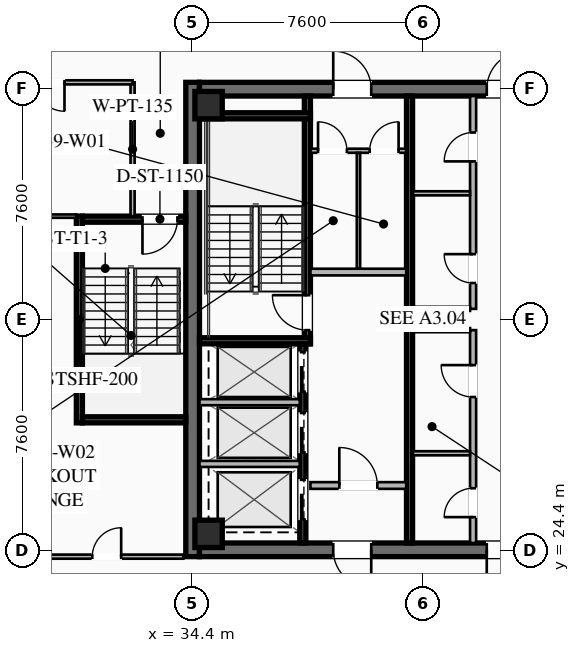
"""IFC4 building model, lengths in metres.
Left out: names, types, materials, properties, quantities, classifications, styles, units other than length and angle.
Written with IfcOpenShell. Run it as: python <this file> out.ifc"""

import sys

from ifc_helpers import new_model, si_unit, direction, frame, frame_2d, origin, origin_2d, place, context, subcontext, project, spatial, rectangle, hollow_rectangle, extrude, element, fill, save


model = new_model("IFC4")
c1 = context("Model", 3, precision=1e-05, world=origin(), true_north=direction((0.0, 1.0)))
c2 = subcontext(c1, "Body", "Model", "MODEL_VIEW")
j1 = project(units=[si_unit("LENGTHUNIT", "METRE"), si_unit("PLANEANGLEUNIT", "RADIAN")], contexts=[c1])
p1 = place(None, origin())
s1 = spatial("IfcSite", under=j1, at=p1, CompositionType="ELEMENT")
p2 = place(p1, origin())
s2 = spatial("IfcBuilding", under=s1, at=p2, CompositionType="ELEMENT")
p3 = place(p2, frame((0.0, 0.0, 255.4)))
s3 = spatial("IfcBuildingStorey", under=s2, at=p3, CompositionType="ELEMENT", Elevation=255.4)
p4 = place(p3, frame((34.425, 24.2, 0.0), z_axis=(0.0, 0.0, 1.0), x_axis=(0.0, 1.0, 0.0)))
e1 = element("IfcWall", 1, at=p4, inside=s3, PredefinedType="SHEAR", context=c2, shape_type="SweptSolid", body=[
    extrude(rectangle(XDim=15.6, YDim=0.45, at=frame_2d((7.8, 0.0))), origin(), (0.0, 0.0, 1.0), 4.0),
])
p5 = place(p3, frame((49.35, 24.425, 0.0), z_axis=(0.0, 0.0, 1.0), x_axis=(-1.0, 0.0, 0.0)))
e2 = element("IfcWall", 2, at=p5, inside=s3, PredefinedType="SHEAR", context=c2, shape_type="SweptSolid", body=[
    extrude(rectangle(XDim=14.7, YDim=0.45, at=frame_2d((7.35, 0.0))), origin(), (0.0, 0.0, 1.0), 4.0),
])
p6 = place(p5, frame((9.05, 0.0, 0.0)))
e3 = element("IfcOpeningElement", 3, at=p6, cuts=e2, PredefinedType="OPENING", context=c2, shape_type="SweptSolid", body=[
    extrude(rectangle(XDim=1.25, YDim=2.25, at=frame_2d((0.625, 1.125))), frame((0.0, 0.235, 0.0), z_axis=(0.0, -1.0, 0.0), x_axis=(1.0, 0.0, 0.0)), (0.0, 0.0, 1.0), 0.47),
])
p7 = place(p5, frame((4.0, 0.0, 0.0)))
e4 = element("IfcOpeningElement", 4, at=p7, cuts=e2, PredefinedType="OPENING", context=c2, shape_type="SweptSolid", body=[
    extrude(rectangle(XDim=1.25, YDim=2.25, at=frame_2d((0.625, 1.125))), frame((0.0, 0.235, 0.0), z_axis=(0.0, -1.0, 0.0), x_axis=(1.0, 0.0, 0.0)), (0.0, 0.0, 1.0), 0.47),
])
p8 = place(p3, frame((34.65, 39.575, 0.0), z_axis=(0.0, 0.0, 1.0), x_axis=(1.0, 0.0, 0.0)))
e5 = element("IfcWall", 5, at=p8, inside=s3, PredefinedType="SHEAR", context=c2, shape_type="SweptSolid", body=[
    extrude(rectangle(XDim=14.7, YDim=0.45, at=frame_2d((7.35, 0.0))), origin(), (0.0, 0.0, 1.0), 4.0),
])
p9 = place(p8, frame((4.4, 0.0, 0.0)))
e6 = element("IfcOpeningElement", 6, at=p9, cuts=e5, PredefinedType="OPENING", context=c2, shape_type="SweptSolid", body=[
    extrude(rectangle(XDim=1.25, YDim=2.25, at=frame_2d((0.625, 1.125))), frame((0.0, 0.235, 0.0), z_axis=(0.0, -1.0, 0.0), x_axis=(1.0, 0.0, 0.0)), (0.0, 0.0, 1.0), 0.47),
])
p10 = place(p8, frame((9.45, 0.0, 0.0)))
e7 = element("IfcOpeningElement", 7, at=p10, cuts=e5, PredefinedType="OPENING", context=c2, shape_type="SweptSolid", body=[
    extrude(rectangle(XDim=1.25, YDim=2.25, at=frame_2d((0.625, 1.125))), frame((0.0, 0.235, 0.0), z_axis=(0.0, -1.0, 0.0), x_axis=(1.0, 0.0, 0.0)), (0.0, 0.0, 1.0), 0.47),
])
for number, where, z_axis, x_axis in (
    (8, (34.95, 24.95, 0.0), (0.0, 0.0, 1.0), (1.0, 0.0, 0.0)),
    (9, (34.95, 39.05, 0.0), (0.0, 0.0, 1.0), (1.0, 0.0, 0.0)),
):
    element("IfcColumn", number, at=place(p3, frame(where, z_axis=z_axis, x_axis=x_axis)), inside=s3, PredefinedType="COLUMN", context=c2, shape_type="SweptSolid", body=[
        extrude(hollow_rectangle(XDim=0.9, YDim=0.9, WallThickness=0.04, at=origin_2d()), origin(), (0.0, 0.0, 1.0), 3.78),
    ])
p11 = place(p3, frame((38.2, 31.2, 0.0), z_axis=(0.0, 0.0, 1.0), x_axis=(0.0, 1.0, 0.0)))
e10 = element("IfcWall", 10, at=p11, inside=s3, PredefinedType="SHEAR", context=c2, shape_type="SweptSolid", body=[
    extrude(rectangle(XDim=8.15, YDim=0.2, at=frame_2d((4.075, 0.0))), origin(), (0.0, 0.0, 1.0), 3.78),
])
p12 = place(p11, frame((0.45, 0.0, 0.0)))
e11 = element("IfcOpeningElement", 11, at=p12, cuts=e10, PredefinedType="OPENING", context=c2, shape_type="SweptSolid", body=[
    extrude(rectangle(XDim=1.15, YDim=2.2, at=frame_2d((0.575, 1.1))), frame((0.0, 0.11, 0.0), z_axis=(0.0, -1.0, 0.0), x_axis=(1.0, 0.0, 0.0)), (0.0, 0.0, 1.0), 0.22),
])
for number, where, z_axis, x_axis in (
    (12, (34.65, 31.3, 0.0), (0.0, 0.0, 1.0), (1.0, 0.0, 0.0)),
    (13, (34.65, 38.7, 0.0), (0.0, 0.0, 1.0), (1.0, 0.0, 0.0)),
):
    element("IfcWall", number, at=place(p3, frame(where, z_axis=z_axis, x_axis=x_axis)), inside=s3, PredefinedType="SHEAR", context=c2, shape_type="SweptSolid", body=[
        extrude(rectangle(XDim=3.65, YDim=0.2, at=frame_2d((1.825, 0.0))), origin(), (0.0, 0.0, 1.0), 3.78),
    ])
p13 = place(p3, frame((41.56, 24.65, 0.0), z_axis=(0.0, 0.0, 1.0), x_axis=(0.0, 1.0, 0.0)))
e14 = element("IfcWall", 14, at=p13, inside=s3, PredefinedType="SHEAR", context=c2, shape_type="SweptSolid", body=[
    extrude(rectangle(XDim=14.7, YDim=0.2, at=frame_2d((7.35, 0.0))), origin(), (0.0, 0.0, 1.0), 3.78),
])
p14 = place(p3, frame((38.3, 33.56, 0.0), z_axis=(0.0, 0.0, 1.0), x_axis=(1.0, 0.0, 0.0)))
e15 = element("IfcWall", 15, at=p14, inside=s3, PredefinedType="SOLIDWALL", context=c2, shape_type="SweptSolid", body=[
    extrude(rectangle(XDim=3.15, YDim=0.22, at=frame_2d((1.575, 0.0))), origin(), (0.0, 0.0, 1.0), 2.971),
])
p15 = place(p3, frame((38.3, 26.54, 0.0), z_axis=(0.0, 0.0, 1.0), x_axis=(1.0, 0.0, 0.0)))
e16 = element("IfcWall", 16, at=p15, inside=s3, PredefinedType="SOLIDWALL", context=c2, shape_type="SweptSolid", body=[
    extrude(rectangle(XDim=3.15, YDim=0.22, at=frame_2d((1.575, 0.0))), origin(), (0.0, 0.0, 1.0), 2.971),
])
p16 = place(p15, frame((0.95, 0.0, 0.0)))
e17 = element("IfcOpeningElement", 17, at=p16, cuts=e16, PredefinedType="OPENING", context=c2, shape_type="SweptSolid", body=[
    extrude(rectangle(XDim=1.25, YDim=2.25, at=frame_2d((0.625, 1.125))), frame((0.0, 0.12, 0.0), z_axis=(0.0, -1.0, 0.0), x_axis=(1.0, 0.0, 0.0)), (0.0, 0.0, 1.0), 0.24),
])
p17 = place(p3, frame((38.05, 24.65, 0.0), z_axis=(0.0, 0.0, 1.0), x_axis=(0.0, 1.0, 0.0)))
e18 = element("IfcWall", 18, at=p17, inside=s3, PredefinedType="SHEAR", context=c2, shape_type="SweptSolid", body=[
    extrude(rectangle(XDim=6.55, YDim=0.2, at=frame_2d((3.275, 0.0))), origin(), (0.0, 0.0, 1.0), 3.78),
])
p18 = place(p17, frame((4.975, 0.0, 0.0)))
e19 = element("IfcOpeningElement", 19, at=p18, cuts=e18, PredefinedType="OPENING", context=c2, shape_type="SweptSolid", body=[
    extrude(rectangle(XDim=1.3, YDim=2.25, at=frame_2d((0.65, 1.125))), frame((0.0, 0.11, 0.0), z_axis=(0.0, -1.0, 0.0), x_axis=(1.0, 0.0, 0.0)), (0.0, 0.0, 1.0), 0.22),
])
p19 = place(p17, frame((2.975, 0.0, 0.0)))
e20 = element("IfcOpeningElement", 20, at=p19, cuts=e18, PredefinedType="OPENING", context=c2, shape_type="SweptSolid", body=[
    extrude(rectangle(XDim=1.3, YDim=2.25, at=frame_2d((0.65, 1.125))), frame((0.0, 0.11, 0.0), z_axis=(0.0, -1.0, 0.0), x_axis=(1.0, 0.0, 0.0)), (0.0, 0.0, 1.0), 0.22),
])
p20 = place(p17, frame((0.775, 0.0, 0.0)))
e21 = element("IfcOpeningElement", 21, at=p20, cuts=e18, PredefinedType="OPENING", context=c2, shape_type="SweptSolid", body=[
    extrude(rectangle(XDim=1.3, YDim=2.25, at=frame_2d((0.65, 1.125))), frame((0.0, 0.11, 0.0), z_axis=(0.0, -1.0, 0.0), x_axis=(1.0, 0.0, 0.0)), (0.0, 0.0, 1.0), 0.22),
])
for number, where, z_axis, x_axis in (
    (22, (34.65, 27.25, 0.0), (0.0, 0.0, 1.0), (1.0, 0.0, 0.0)),
    (23, (34.65, 29.28, 0.0), (0.0, 0.0, 1.0), (1.0, 0.0, 0.0)),
):
    element("IfcWall", number, at=place(p3, frame(where, z_axis=z_axis, x_axis=x_axis)), inside=s3, PredefinedType="SOLIDWALL", context=c2, shape_type="SweptSolid", body=[
        extrude(rectangle(XDim=3.3, YDim=0.2, at=frame_2d((1.65, 0.0))), origin(), (0.0, 0.0, 1.0), 3.78),
    ])
p21 = place(p3, frame((38.3, 37.55, 0.0), z_axis=(0.0, 0.0, 1.0), x_axis=(1.0, 0.0, 0.0)))
e24 = element("IfcWall", 24, at=p21, inside=s3, PredefinedType="PARTITIONING", context=c2, shape_type="SweptSolid", body=[
    extrude(rectangle(XDim=3.15, YDim=0.135, at=frame_2d((1.575, 0.0))), origin(), (0.0, 0.0, 1.0), 2.971),
])
p22 = place(p21, frame((0.25, 0.0, 0.0)))
e25 = element("IfcOpeningElement", 25, at=p22, cuts=e24, PredefinedType="OPENING", context=c2, shape_type="SweptSolid", body=[
    extrude(rectangle(XDim=0.95, YDim=2.05, at=frame_2d((0.475, 1.025))), frame((0.0, 0.077, 0.0), z_axis=(0.0, -1.0, 0.0), x_axis=(1.0, 0.0, 0.0)), (0.0, 0.0, 1.0), 0.155),
])
p23 = place(p21, frame((1.95, 0.0, 0.0)))
e26 = element("IfcOpeningElement", 26, at=p23, cuts=e24, PredefinedType="OPENING", context=c2, shape_type="SweptSolid", body=[
    extrude(rectangle(XDim=0.95, YDim=2.05, at=frame_2d((0.475, 1.025))), frame((0.0, 0.077, 0.0), z_axis=(0.0, -1.0, 0.0), x_axis=(1.0, 0.0, 0.0)), (0.0, 0.0, 1.0), 0.155),
])
p24 = place(p3, frame((39.88, 33.68, 0.0), z_axis=(0.0, 0.0, 1.0), x_axis=(0.0, 1.0, 0.0)))
e27 = element("IfcWall", 27, at=p24, inside=s3, PredefinedType="PARTITIONING", context=c2, shape_type="SweptSolid", body=[
    extrude(rectangle(XDim=3.8, YDim=0.11, at=frame_2d((1.9, 0.0))), origin(), (0.0, 0.0, 1.0), 2.971),
])
p25 = place(p3, frame((43.65, 24.65, 0.0), z_axis=(0.0, 0.0, 1.0), x_axis=(0.0, 1.0, 0.0)))
e28 = element("IfcWall", 28, at=p25, inside=s3, PredefinedType="SOLIDWALL", context=c2, shape_type="SweptSolid", body=[
    extrude(rectangle(XDim=7.0, YDim=0.2, at=frame_2d((3.5, 0.0))), origin(), (0.0, 0.0, 1.0), 2.971),
])
p26 = place(p25, frame((0.85, 0.0, 0.0)))
e29 = element("IfcOpeningElement", 29, at=p26, cuts=e28, PredefinedType="OPENING", context=c2, shape_type="SweptSolid", body=[
    extrude(rectangle(XDim=0.95, YDim=2.05, at=frame_2d((0.475, 1.025))), frame((0.0, 0.11, 0.0), z_axis=(0.0, -1.0, 0.0), x_axis=(1.0, 0.0, 0.0)), (0.0, 0.0, 1.0), 0.22),
])
p27 = place(p25, frame((4.8, 0.0, 0.0)))
e30 = element("IfcOpeningElement", 30, at=p27, cuts=e28, PredefinedType="OPENING", context=c2, shape_type="SweptSolid", body=[
    extrude(rectangle(XDim=1.05, YDim=2.2, at=frame_2d((0.525, 1.1))), frame((0.0, 0.11, 0.0), z_axis=(0.0, -1.0, 0.0), x_axis=(1.0, 0.0, 0.0)), (0.0, 0.0, 1.0), 0.22),
])
for number, where, z_axis, x_axis in (
    (31, (41.67, 31.65, 0.0), (0.0, 0.0, 1.0), (1.0, 0.0, 0.0)),
    (32, (41.67, 27.6, 0.0), (0.0, 0.0, 1.0), (1.0, 0.0, 0.0)),
):
    element("IfcWall", number, at=place(p3, frame(where, z_axis=z_axis, x_axis=x_axis)), inside=s3, PredefinedType="PARTITIONING", context=c2, shape_type="SweptSolid", body=[
        extrude(rectangle(XDim=1.88, YDim=0.135, at=frame_2d((0.94, 0.0))), origin(), (0.0, 0.0, 1.0), 2.971),
    ])
p28 = place(p3, frame((43.65, 32.35, 0.0), z_axis=(0.0, 0.0, 1.0), x_axis=(0.0, 1.0, 0.0)))
e33 = element("IfcWall", 33, at=p28, inside=s3, PredefinedType="SOLIDWALL", context=c2, shape_type="SweptSolid", body=[
    extrude(rectangle(XDim=7.0, YDim=0.2, at=frame_2d((3.5, 0.0))), origin(), (0.0, 0.0, 1.0), 2.971),
])
p29 = place(p28, frame((0.85, 0.0, 0.0)))
e34 = element("IfcOpeningElement", 34, at=p29, cuts=e33, PredefinedType="OPENING", context=c2, shape_type="SweptSolid", body=[
    extrude(rectangle(XDim=0.95, YDim=2.05, at=frame_2d((0.475, 1.025))), frame((0.0, 0.11, 0.0), z_axis=(0.0, -1.0, 0.0), x_axis=(1.0, 0.0, 0.0)), (0.0, 0.0, 1.0), 0.22),
])
p30 = place(p28, frame((4.85, 0.0, 0.0)))
e35 = element("IfcOpeningElement", 35, at=p30, cuts=e33, PredefinedType="OPENING", context=c2, shape_type="SweptSolid", body=[
    extrude(rectangle(XDim=0.95, YDim=2.05, at=frame_2d((0.475, 1.025))), frame((0.0, 0.11, 0.0), z_axis=(0.0, -1.0, 0.0), x_axis=(1.0, 0.0, 0.0)), (0.0, 0.0, 1.0), 0.22),
])
for number, where, z_axis, x_axis in (
    (36, (41.67, 32.35, 0.0), (0.0, 0.0, 1.0), (1.0, 0.0, 0.0)),
    (37, (41.67, 36.15, 0.0), (0.0, 0.0, 1.0), (1.0, 0.0, 0.0)),
):
    element("IfcWall", number, at=place(p3, frame(where, z_axis=z_axis, x_axis=x_axis)), inside=s3, PredefinedType="PARTITIONING", context=c2, shape_type="SweptSolid", body=[
        extrude(rectangle(XDim=1.88, YDim=0.135, at=frame_2d((0.94, 0.0))), origin(), (0.0, 0.0, 1.0), 2.971),
    ])
p31 = place(p3, frame((30.7, 28.6, 0.0), z_axis=(0.0, 0.0, 1.0), x_axis=(0.0, 1.0, 0.0)))
e38 = element("IfcWall", 38, at=p31, inside=s3, PredefinedType="SHEAR", context=c2, shape_type="SweptSolid", body=[
    extrude(rectangle(XDim=6.8, YDim=0.2, at=frame_2d((3.4, 0.0))), origin(), (0.0, 0.0, 1.0), 3.78),
])
p32 = place(p3, frame((34.2, 35.3, 0.0), z_axis=(0.0, 0.0, 1.0), x_axis=(-1.0, 0.0, 0.0)))
e39 = element("IfcWall", 39, at=p32, inside=s3, PredefinedType="SHEAR", context=c2, shape_type="SweptSolid", body=[
    extrude(rectangle(XDim=3.4, YDim=0.2, at=frame_2d((1.7, 0.0))), origin(), (0.0, 0.0, 1.0), 3.78),
])
p33 = place(p32, frame((0.275, 0.0, 0.0)))
e40 = element("IfcOpeningElement", 40, at=p33, cuts=e39, PredefinedType="OPENING", context=c2, shape_type="SweptSolid", body=[
    extrude(rectangle(XDim=1.15, YDim=2.2, at=frame_2d((0.575, 1.1))), frame((0.0, 0.11, 0.0), z_axis=(0.0, -1.0, 0.0), x_axis=(1.0, 0.0, 0.0)), (0.0, 0.0, 1.0), 0.22),
])
p34 = place(p3, frame((30.8, 28.7, 0.0), z_axis=(0.0, 0.0, 1.0), x_axis=(1.0, 0.0, 0.0)))
e41 = element("IfcWall", 41, at=p34, inside=s3, PredefinedType="SHEAR", context=c2, shape_type="SweptSolid", body=[
    extrude(rectangle(XDim=3.4, YDim=0.2, at=frame_2d((1.7, 0.0))), origin(), (0.0, 0.0, 1.0), 3.78),
])
p35 = place(p3, frame((32.45, 35.4, 0.0), z_axis=(0.0, 0.0, 1.0), x_axis=(0.0, 1.0, 0.0)))
e42 = element("IfcWall", 42, at=p35, inside=s3, PredefinedType="PARTITIONING", context=c2, shape_type="SweptSolid", body=[
    extrude(rectangle(XDim=4.4, YDim=0.135, at=frame_2d((2.2, 0.0))), origin(), (0.0, 0.0, 1.0), 2.971),
])
p36 = place(p3, frame((32.45, 39.8, 0.0), z_axis=(0.0, 0.0, 1.0), x_axis=(-1.0, 0.0, 0.0)))
e43 = element("IfcWall", 43, at=p36, inside=s3, PredefinedType="PARTITIONING", context=c2, shape_type="SweptSolid", body=[
    extrude(rectangle(XDim=6.13, YDim=0.135, at=frame_2d((3.065, 0.0))), origin(), (0.0, 0.0, 1.0), 2.971),
])
p37 = place(p36, frame((2.24, 0.0, 0.0)))
e44 = element("IfcOpeningElement", 44, at=p37, cuts=e43, PredefinedType="OPENING", context=c2, shape_type="SweptSolid", body=[
    extrude(rectangle(XDim=0.95, YDim=2.05, at=frame_2d((0.475, 1.025))), frame((0.0, 0.077, 0.0), z_axis=(0.0, -1.0, 0.0), x_axis=(1.0, 0.0, 0.0)), (0.0, 0.0, 1.0), 0.155),
])
p38 = place(p3, frame((26.32, 24.2, 0.0), z_axis=(0.0, 0.0, 1.0), x_axis=(1.0, 0.0, 0.0)))
e45 = element("IfcWall", 45, at=p38, inside=s3, PredefinedType="PARTITIONING", context=c2, shape_type="SweptSolid", body=[
    extrude(rectangle(XDim=7.8, YDim=0.135, at=frame_2d((3.9, 0.0))), origin(), (0.0, 0.0, 1.0), 2.971),
])
p39 = place(p38, frame((4.805, 0.0, 0.0)))
e46 = element("IfcOpeningElement", 46, at=p39, cuts=e45, PredefinedType="OPENING", context=c2, shape_type="SweptSolid", body=[
    extrude(rectangle(XDim=0.95, YDim=2.05, at=frame_2d((0.475, 1.025))), frame((0.0, 0.077, 0.0), z_axis=(0.0, -1.0, 0.0), x_axis=(1.0, 0.0, 0.0)), (0.0, 0.0, 1.0), 0.155),
])
p40 = place(p3, frame((30.6, 35.4, 0.0), z_axis=(0.0, 0.0, 1.0), x_axis=(-1.0, 0.0, 0.0)))
e47 = element("IfcWall", 47, at=p40, inside=s3, PredefinedType="PARTITIONING", context=c2, shape_type="SweptSolid", body=[
    extrude(rectangle(XDim=4.28, YDim=0.11, at=frame_2d((2.14, 0.0))), origin(), (0.0, 0.0, 1.0), 2.971),
])
p41 = place(p9, origin())
e48 = element("IfcDoor", 48, at=p41, inside=s3, OperationType="SINGLE_SWING_LEFT", PredefinedType="DOOR", context=c2, shape_type="SweptSolid", body=[
    extrude(rectangle(XDim=1.25, YDim=2.25, at=frame_2d((0.625, 1.125))), frame((0.0, 0.025, 0.0), z_axis=(0.0, -1.0, 0.0), x_axis=(1.0, 0.0, 0.0)), (0.0, 0.0, 1.0), 0.05),
])
fill(e6, e48)
p42 = place(p10, origin())
e49 = element("IfcDoor", 49, at=p42, inside=s3, OperationType="SINGLE_SWING_RIGHT", PredefinedType="DOOR", context=c2, shape_type="SweptSolid", body=[
    extrude(rectangle(XDim=1.25, YDim=2.25, at=frame_2d((0.625, 1.125))), frame((0.0, 0.025, 0.0), z_axis=(0.0, -1.0, 0.0), x_axis=(1.0, 0.0, 0.0)), (0.0, 0.0, 1.0), 0.05),
])
fill(e7, e49)
p43 = place(p6, origin())
e50 = element("IfcDoor", 50, at=p43, inside=s3, OperationType="SINGLE_SWING_LEFT", PredefinedType="DOOR", context=c2, shape_type="SweptSolid", body=[
    extrude(rectangle(XDim=1.25, YDim=2.25, at=frame_2d((0.625, 1.125))), frame((0.0, 0.025, 0.0), z_axis=(0.0, -1.0, 0.0), x_axis=(1.0, 0.0, 0.0)), (0.0, 0.0, 1.0), 0.05),
])
fill(e3, e50)
p44 = place(p7, origin())
e51 = element("IfcDoor", 51, at=p44, inside=s3, OperationType="SINGLE_SWING_RIGHT", PredefinedType="DOOR", context=c2, shape_type="SweptSolid", body=[
    extrude(rectangle(XDim=1.25, YDim=2.25, at=frame_2d((0.625, 1.125))), frame((0.0, 0.025, 0.0), z_axis=(0.0, -1.0, 0.0), x_axis=(1.0, 0.0, 0.0)), (0.0, 0.0, 1.0), 0.05),
])
fill(e4, e51)
p45 = place(p12, origin())
e52 = element("IfcDoor", 52, at=p45, inside=s3, OperationType="SINGLE_SWING_RIGHT", PredefinedType="DOOR", context=c2, shape_type="SweptSolid", body=[
    extrude(rectangle(XDim=1.15, YDim=2.2, at=frame_2d((0.575, 1.1))), frame((0.0, 0.025, 0.0), z_axis=(0.0, -1.0, 0.0), x_axis=(1.0, 0.0, 0.0)), (0.0, 0.0, 1.0), 0.05),
])
fill(e11, e52)
p46 = place(p16, origin())
e53 = element("IfcDoor", 53, at=p46, inside=s3, OperationType="SINGLE_SWING_LEFT", PredefinedType="DOOR", context=c2, shape_type="SweptSolid", body=[
    extrude(rectangle(XDim=1.25, YDim=2.25, at=frame_2d((0.625, 1.125))), frame((0.0, 0.025, 0.0), z_axis=(0.0, -1.0, 0.0), x_axis=(1.0, 0.0, 0.0)), (0.0, 0.0, 1.0), 0.05),
])
fill(e17, e53)
p47 = place(p22, origin())
e54 = element("IfcDoor", 54, at=p47, inside=s3, OperationType="SINGLE_SWING_LEFT", PredefinedType="DOOR", context=c2, shape_type="SweptSolid", body=[
    extrude(rectangle(XDim=0.95, YDim=2.05, at=frame_2d((0.475, 1.025))), frame((0.0, 0.025, 0.0), z_axis=(0.0, -1.0, 0.0), x_axis=(1.0, 0.0, 0.0)), (0.0, 0.0, 1.0), 0.05),
])
fill(e25, e54)
p48 = place(p23, origin())
e55 = element("IfcDoor", 55, at=p48, inside=s3, OperationType="SINGLE_SWING_RIGHT", PredefinedType="DOOR", context=c2, shape_type="SweptSolid", body=[
    extrude(rectangle(XDim=0.95, YDim=2.05, at=frame_2d((0.475, 1.025))), frame((0.0, 0.025, 0.0), z_axis=(0.0, -1.0, 0.0), x_axis=(1.0, 0.0, 0.0)), (0.0, 0.0, 1.0), 0.05),
])
fill(e26, e55)
p49 = place(p26, origin())
e56 = element("IfcDoor", 56, at=p49, inside=s3, OperationType="SINGLE_SWING_LEFT", PredefinedType="DOOR", context=c2, shape_type="SweptSolid", body=[
    extrude(rectangle(XDim=0.95, YDim=2.05, at=frame_2d((0.475, 1.025))), frame((0.0, 0.025, 0.0), z_axis=(0.0, -1.0, 0.0), x_axis=(1.0, 0.0, 0.0)), (0.0, 0.0, 1.0), 0.05),
])
fill(e29, e56)
p50 = place(p27, origin())
e57 = element("IfcDoor", 57, at=p50, inside=s3, OperationType="SINGLE_SWING_RIGHT", PredefinedType="DOOR", context=c2, shape_type="SweptSolid", body=[
    extrude(rectangle(XDim=1.05, YDim=2.2, at=frame_2d((0.525, 1.1))), frame((0.0, 0.025, 0.0), z_axis=(0.0, -1.0, 0.0), x_axis=(1.0, 0.0, 0.0)), (0.0, 0.0, 1.0), 0.05),
])
fill(e30, e57)
p51 = place(p29, origin())
e58 = element("IfcDoor", 58, at=p51, inside=s3, OperationType="SINGLE_SWING_RIGHT", PredefinedType="DOOR", context=c2, shape_type="SweptSolid", body=[
    extrude(rectangle(XDim=0.95, YDim=2.05, at=frame_2d((0.475, 1.025))), frame((0.0, 0.025, 0.0), z_axis=(0.0, -1.0, 0.0), x_axis=(1.0, 0.0, 0.0)), (0.0, 0.0, 1.0), 0.05),
])
fill(e34, e58)
p52 = place(p30, origin())
e59 = element("IfcDoor", 59, at=p52, inside=s3, OperationType="SINGLE_SWING_LEFT", PredefinedType="DOOR", context=c2, shape_type="SweptSolid", body=[
    extrude(rectangle(XDim=0.95, YDim=2.05, at=frame_2d((0.475, 1.025))), frame((0.0, 0.025, 0.0), z_axis=(0.0, -1.0, 0.0), x_axis=(1.0, 0.0, 0.0)), (0.0, 0.0, 1.0), 0.05),
])
fill(e35, e59)
p53 = place(p33, origin())
e60 = element("IfcDoor", 60, at=p53, inside=s3, OperationType="SINGLE_SWING_RIGHT", PredefinedType="DOOR", context=c2, shape_type="SweptSolid", body=[
    extrude(rectangle(XDim=1.15, YDim=2.2, at=frame_2d((0.575, 1.1))), frame((0.0, 0.025, 0.0), z_axis=(0.0, -1.0, 0.0), x_axis=(1.0, 0.0, 0.0)), (0.0, 0.0, 1.0), 0.05),
])
fill(e40, e60)
p54 = place(p37, origin())
e61 = element("IfcDoor", 61, at=p54, inside=s3, OperationType="SINGLE_SWING_LEFT", PredefinedType="DOOR", context=c2, shape_type="SweptSolid", body=[
    extrude(rectangle(XDim=0.95, YDim=2.05, at=frame_2d((0.475, 1.025))), frame((0.0, 0.025, 0.0), z_axis=(0.0, -1.0, 0.0), x_axis=(1.0, 0.0, 0.0)), (0.0, 0.0, 1.0), 0.05),
])
fill(e44, e61)
p55 = place(p39, origin())
e62 = element("IfcDoor", 62, at=p55, inside=s3, OperationType="SINGLE_SWING_RIGHT", PredefinedType="DOOR", context=c2, shape_type="SweptSolid", body=[
    extrude(rectangle(XDim=0.95, YDim=2.05, at=frame_2d((0.475, 1.025))), frame((0.0, 0.025, 0.0), z_axis=(0.0, -1.0, 0.0), x_axis=(1.0, 0.0, 0.0)), (0.0, 0.0, 1.0), 0.05),
])
fill(e46, e62)
p56 = place(p18, origin())
e63 = element("IfcDoor", 63, at=p56, inside=s3, OperationType="SLIDING_TO_LEFT", PredefinedType="DOOR", context=c2, shape_type="SweptSolid", body=[
    extrude(rectangle(XDim=1.3, YDim=2.25, at=frame_2d((0.65, 1.125))), frame((0.0, 0.025, 0.0), z_axis=(0.0, -1.0, 0.0), x_axis=(1.0, 0.0, 0.0)), (0.0, 0.0, 1.0), 0.05),
])
fill(e19, e63)
p57 = place(p19, origin())
e64 = element("IfcDoor", 64, at=p57, inside=s3, OperationType="SLIDING_TO_LEFT", PredefinedType="DOOR", context=c2, shape_type="SweptSolid", body=[
    extrude(rectangle(XDim=1.3, YDim=2.25, at=frame_2d((0.65, 1.125))), frame((0.0, 0.025, 0.0), z_axis=(0.0, -1.0, 0.0), x_axis=(1.0, 0.0, 0.0)), (0.0, 0.0, 1.0), 0.05),
])
fill(e20, e64)
p58 = place(p20, origin())
e65 = element("IfcDoor", 65, at=p58, inside=s3, OperationType="SLIDING_TO_LEFT", PredefinedType="DOOR", context=c2, shape_type="SweptSolid", body=[
    extrude(rectangle(XDim=1.3, YDim=2.25, at=frame_2d((0.65, 1.125))), frame((0.0, 0.025, 0.0), z_axis=(0.0, -1.0, 0.0), x_axis=(1.0, 0.0, 0.0)), (0.0, 0.0, 1.0), 0.05),
])
fill(e21, e65)
save(model, sys.argv[1])
